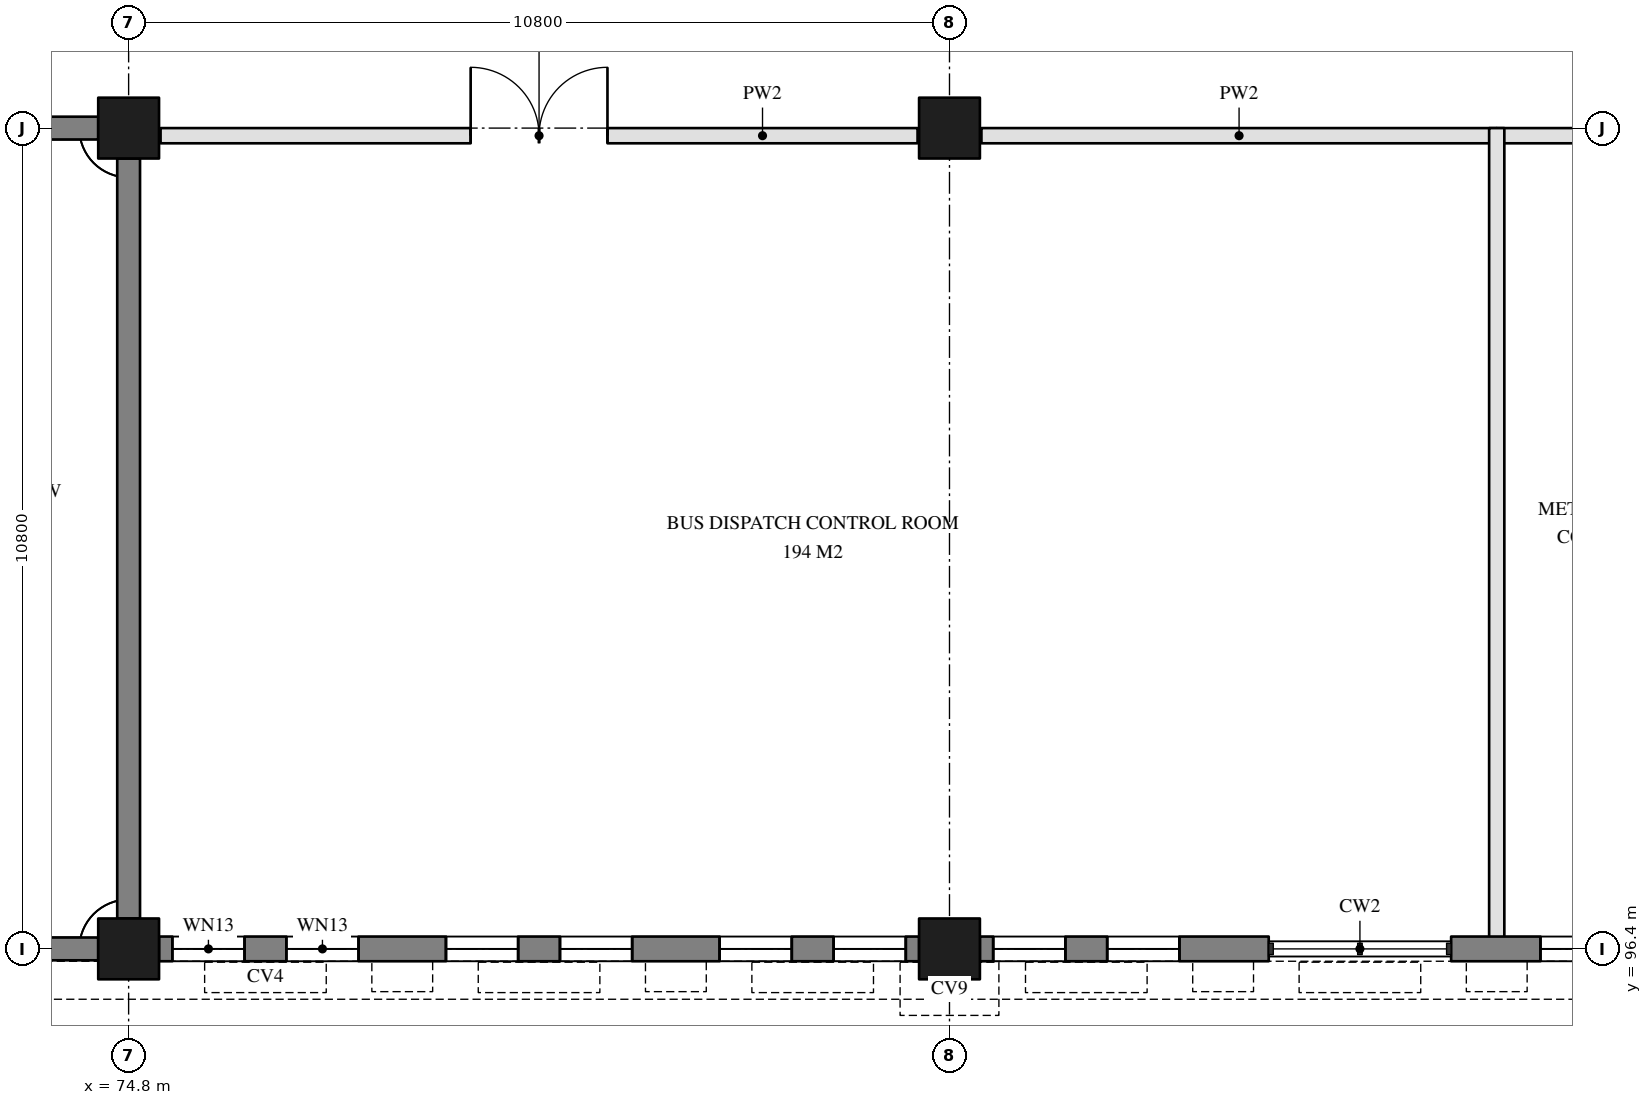
"""IFC4 building model, lengths in metres.
Left out: names, types, materials, properties, quantities, classifications, styles, units other than length and angle.
Written with IfcOpenShell. Run it as: python <this file> out.ifc"""

import sys

from ifc_helpers import new_model, si_unit, direction, frame, frame_2d, origin, origin_2d, place, context, subcontext, project, spatial, rectangle, extrude, element, fill, save


model = new_model("IFC4")
c1 = context("Model", 3, precision=1e-05, world=origin(), true_north=direction((0.0, 1.0)))
c2 = subcontext(c1, "Body", "Model", "MODEL_VIEW")
j1 = project(units=[si_unit("LENGTHUNIT", "METRE"), si_unit("PLANEANGLEUNIT", "RADIAN")], contexts=[c1])
p1 = place(None, origin())
s1 = spatial("IfcSite", under=j1, at=p1, CompositionType="ELEMENT")
p2 = place(p1, origin())
s2 = spatial("IfcBuilding", under=s1, at=p2, CompositionType="ELEMENT")
p3 = place(p2, frame((0.0, 0.0, 8.7)))
s3 = spatial("IfcBuildingStorey", under=s2, at=p3, CompositionType="ELEMENT", Elevation=8.7)
for number, where, z_axis, x_axis in (
    (1, (74.8, 96.4, 0.0), (0.0, 0.0, 1.0), (1.0, 0.0, 0.0)),
    (2, (74.8, 107.2, 0.0), (0.0, 0.0, 1.0), (1.0, 0.0, 0.0)),
    (3, (85.6, 96.4, 0.0), (0.0, 0.0, 1.0), (1.0, 0.0, 0.0)),
    (4, (85.6, 107.2, 0.0), (0.0, 0.0, 1.0), (1.0, 0.0, 0.0)),
):
    element("IfcColumn", number, at=place(p3, frame(where, z_axis=z_axis, x_axis=x_axis)), inside=s3, PredefinedType="COLUMN", context=c2, shape_type="SweptSolid", body=[
        extrude(rectangle(XDim=0.8, YDim=0.8, at=origin_2d()), origin(), (0.0, 0.0, 1.0), 3.9),
    ])
for number, where, z_axis, x_axis in (
    (5, (64.4, 96.4, 0.0), (0.0, 0.0, 1.0), (1.0, 0.0, 0.0)),
    (6, (74.8, 96.8, 0.0), (0.0, 0.0, 1.0), (0.0, 1.0, 0.0)),
):
    element("IfcWall", number, at=place(p3, frame(where, z_axis=z_axis, x_axis=x_axis)), inside=s3, PredefinedType="SOLIDWALL", context=c2, shape_type="SweptSolid", body=[
        extrude(rectangle(XDim=10.0, YDim=0.3, at=frame_2d((5.0, 0.0))), origin(), (0.0, 0.0, 1.0), 3.9),
    ])
p4 = place(p3, frame((74.4, 107.2, 0.0), z_axis=(0.0, 0.0, 1.0), x_axis=(-1.0, 0.0, 0.0)))
e7 = element("IfcWall", 7, at=p4, inside=s3, PredefinedType="SOLIDWALL", context=c2, shape_type="SweptSolid", body=[
    extrude(rectangle(XDim=10.0, YDim=0.3, at=frame_2d((5.0, 0.0))), origin(), (0.0, 0.0, 1.0), 3.9),
])
p5 = place(p4, frame((2.0, 0.0, 0.0)))
e8 = element("IfcOpeningElement", 8, at=p5, cuts=e7, PredefinedType="OPENING", context=c2, shape_type="SweptSolid", body=[
    extrude(rectangle(XDim=1.8, YDim=2.1, at=frame_2d((0.9, 1.05))), frame((0.0, 0.16, 0.0), z_axis=(0.0, -1.0, 0.0), x_axis=(1.0, 0.0, 0.0)), (0.0, 0.0, 1.0), 0.32),
])
p6 = place(p4, frame((4.4, 0.0, 0.0)))
e9 = element("IfcOpeningElement", 9, at=p6, cuts=e7, PredefinedType="OPENING", context=c2, shape_type="SweptSolid", body=[
    extrude(rectangle(XDim=1.0, YDim=2.1, at=frame_2d((0.5, 1.05))), frame((0.0, 0.16, 0.0), z_axis=(0.0, -1.0, 0.0), x_axis=(1.0, 0.0, 0.0)), (0.0, 0.0, 1.0), 0.32),
])
p7 = place(p4, frame((6.8, 0.0, 0.0)))
e10 = element("IfcOpeningElement", 10, at=p7, cuts=e7, PredefinedType="OPENING", context=c2, shape_type="SweptSolid", body=[
    extrude(rectangle(XDim=0.9, YDim=2.1, at=frame_2d((0.45, 1.05))), frame((0.0, 0.16, 0.0), z_axis=(0.0, -1.0, 0.0), x_axis=(1.0, 0.0, 0.0)), (0.0, 0.0, 1.0), 0.32),
])
p8 = place(p3, frame((75.2, 96.4, 0.0), z_axis=(0.0, 0.0, 1.0), x_axis=(1.0, 0.0, 0.0)))
e11 = element("IfcWall", 11, at=p8, inside=s3, PredefinedType="SOLIDWALL", context=c2, shape_type="SweptSolid", body=[
    extrude(rectangle(XDim=10.0, YDim=0.325, at=frame_2d((5.0, 0.0))), origin(), (0.0, 0.0, 1.0), 2.8),
])
p9 = place(p8, frame((0.175, 0.0, 0.5)))
e12 = element("IfcOpeningElement", 12, at=p9, cuts=e11, PredefinedType="OPENING", context=c2, shape_type="SweptSolid", body=[
    extrude(rectangle(XDim=0.95, YDim=2.25, at=frame_2d((0.475, 1.125))), frame((0.0, 0.172, 0.0), z_axis=(0.0, -1.0, 0.0), x_axis=(1.0, 0.0, 0.0)), (0.0, 0.0, 1.0), 0.345),
])
p10 = place(p8, frame((3.775, 0.0, 0.5)))
e13 = element("IfcOpeningElement", 13, at=p10, cuts=e11, PredefinedType="OPENING", context=c2, shape_type="SweptSolid", body=[
    extrude(rectangle(XDim=0.95, YDim=2.25, at=frame_2d((0.475, 1.125))), frame((0.0, 0.172, 0.0), z_axis=(0.0, -1.0, 0.0), x_axis=(1.0, 0.0, 0.0)), (0.0, 0.0, 1.0), 0.345),
])
p11 = place(p8, frame((7.375, 0.0, 0.5)))
e14 = element("IfcOpeningElement", 14, at=p11, cuts=e11, PredefinedType="OPENING", context=c2, shape_type="SweptSolid", body=[
    extrude(rectangle(XDim=0.95, YDim=2.25, at=frame_2d((0.475, 1.125))), frame((0.0, 0.172, 0.0), z_axis=(0.0, -1.0, 0.0), x_axis=(1.0, 0.0, 0.0)), (0.0, 0.0, 1.0), 0.345),
])
p12 = place(p8, frame((1.675, 0.0, 0.5)))
e15 = element("IfcOpeningElement", 15, at=p12, cuts=e11, PredefinedType="OPENING", context=c2, shape_type="SweptSolid", body=[
    extrude(rectangle(XDim=0.95, YDim=2.25, at=frame_2d((0.475, 1.125))), frame((0.0, 0.172, 0.0), z_axis=(0.0, -1.0, 0.0), x_axis=(1.0, 0.0, 0.0)), (0.0, 0.0, 1.0), 0.345),
])
p13 = place(p8, frame((5.275, 0.0, 0.5)))
e16 = element("IfcOpeningElement", 16, at=p13, cuts=e11, PredefinedType="OPENING", context=c2, shape_type="SweptSolid", body=[
    extrude(rectangle(XDim=0.95, YDim=2.25, at=frame_2d((0.475, 1.125))), frame((0.0, 0.172, 0.0), z_axis=(0.0, -1.0, 0.0), x_axis=(1.0, 0.0, 0.0)), (0.0, 0.0, 1.0), 0.345),
])
p14 = place(p8, frame((8.875, 0.0, 0.5)))
e17 = element("IfcOpeningElement", 17, at=p14, cuts=e11, PredefinedType="OPENING", context=c2, shape_type="SweptSolid", body=[
    extrude(rectangle(XDim=0.95, YDim=2.25, at=frame_2d((0.475, 1.125))), frame((0.0, 0.172, 0.0), z_axis=(0.0, -1.0, 0.0), x_axis=(1.0, 0.0, 0.0)), (0.0, 0.0, 1.0), 0.345),
])
p15 = place(p3, frame((86.0, 96.4, 0.0), z_axis=(0.0, 0.0, 1.0), x_axis=(1.0, 0.0, 0.0)))
e18 = element("IfcWall", 18, at=p15, inside=s3, PredefinedType="SOLIDWALL", context=c2, shape_type="SweptSolid", body=[
    extrude(rectangle(XDim=3.8, YDim=0.325, at=frame_2d((1.9, 0.0))), origin(), (0.0, 0.0, 1.0), 2.8),
])
p16 = place(p15, frame((0.175, 0.0, 0.5)))
e19 = element("IfcOpeningElement", 19, at=p16, cuts=e18, PredefinedType="OPENING", context=c2, shape_type="SweptSolid", body=[
    extrude(rectangle(XDim=0.95, YDim=2.25, at=frame_2d((0.475, 1.125))), frame((0.0, 0.172, 0.0), z_axis=(0.0, -1.0, 0.0), x_axis=(1.0, 0.0, 0.0)), (0.0, 0.0, 1.0), 0.345),
])
p17 = place(p15, frame((1.675, 0.0, 0.5)))
e20 = element("IfcOpeningElement", 20, at=p17, cuts=e18, PredefinedType="OPENING", context=c2, shape_type="SweptSolid", body=[
    extrude(rectangle(XDim=0.95, YDim=2.25, at=frame_2d((0.475, 1.125))), frame((0.0, 0.172, 0.0), z_axis=(0.0, -1.0, 0.0), x_axis=(1.0, 0.0, 0.0)), (0.0, 0.0, 1.0), 0.345),
])
p18 = place(p3, frame((92.2, 96.4, 0.0), z_axis=(0.0, 0.0, 1.0), x_axis=(1.0, 0.0, 0.0)))
e21 = element("IfcWall", 21, at=p18, inside=s3, PredefinedType="SOLIDWALL", context=c2, shape_type="SweptSolid", body=[
    extrude(rectangle(XDim=3.8, YDim=0.325, at=frame_2d((1.9, 0.0))), origin(), (0.0, 0.0, 1.0), 2.8),
])
p19 = place(p18, frame((1.175, 0.0, 0.5)))
e22 = element("IfcOpeningElement", 22, at=p19, cuts=e21, PredefinedType="OPENING", context=c2, shape_type="SweptSolid", body=[
    extrude(rectangle(XDim=0.95, YDim=2.25, at=frame_2d((0.475, 1.125))), frame((0.0, 0.172, 0.0), z_axis=(0.0, -1.0, 0.0), x_axis=(1.0, 0.0, 0.0)), (0.0, 0.0, 1.0), 0.345),
])
p20 = place(p18, frame((2.675, 0.0, 0.5)))
e23 = element("IfcOpeningElement", 23, at=p20, cuts=e21, PredefinedType="OPENING", context=c2, shape_type="SweptSolid", body=[
    extrude(rectangle(XDim=0.95, YDim=2.25, at=frame_2d((0.475, 1.125))), frame((0.0, 0.172, 0.0), z_axis=(0.0, -1.0, 0.0), x_axis=(1.0, 0.0, 0.0)), (0.0, 0.0, 1.0), 0.345),
])
p21 = place(p3, frame((86.02, 107.1, 0.0), z_axis=(0.0, 0.0, 1.0), x_axis=(1.0, 0.0, 0.0)))
e24 = element("IfcWall", 24, at=p21, inside=s3, PredefinedType="PARTITIONING", context=c2, shape_type="SweptSolid", body=[
    extrude(rectangle(XDim=6.78, YDim=0.2, at=frame_2d((3.39, 0.0))), origin(), (0.0, 0.0, 1.0), 2.8),
])
p22 = place(p3, frame((75.22, 107.1, 0.0), z_axis=(0.0, 0.0, 1.0), x_axis=(1.0, 0.0, 0.0)))
e25 = element("IfcWall", 25, at=p22, inside=s3, PredefinedType="PARTITIONING", context=c2, shape_type="SweptSolid", body=[
    extrude(rectangle(XDim=9.96, YDim=0.2, at=frame_2d((4.98, 0.0))), origin(), (0.0, 0.0, 1.0), 2.8),
])
p23 = place(p22, frame((4.08, 0.0, 0.0)))
e26 = element("IfcOpeningElement", 26, at=p23, cuts=e25, PredefinedType="OPENING", context=c2, shape_type="SweptSolid", body=[
    extrude(rectangle(XDim=1.8, YDim=2.1, at=frame_2d((0.9, 1.05))), frame((0.0, 0.11, 0.0), z_axis=(0.0, -1.0, 0.0), x_axis=(1.0, 0.0, 0.0)), (0.0, 0.0, 1.0), 0.22),
])
p24 = place(p3, frame((92.8, 107.1, 0.0), z_axis=(0.0, 0.0, 1.0), x_axis=(1.0, 0.0, 0.0)))
e27 = element("IfcWall", 27, at=p24, inside=s3, PredefinedType="PARTITIONING", context=c2, shape_type="SweptSolid", body=[
    extrude(rectangle(XDim=3.18, YDim=0.2, at=frame_2d((1.59, 0.0))), origin(), (0.0, 0.0, 1.0), 2.8),
])
p25 = place(p3, frame((92.8, 96.4, 0.0), z_axis=(0.0, 0.0, 1.0), x_axis=(0.0, 1.0, 0.0)))
e28 = element("IfcWall", 28, at=p25, inside=s3, PredefinedType="PARTITIONING", context=c2, shape_type="SweptSolid", body=[
    extrude(rectangle(XDim=10.8, YDim=0.2, at=frame_2d((5.4, 0.0))), origin(), (0.0, 0.0, 1.0), 2.8),
])
p26 = place(p9, origin())
e29 = element("IfcWindow", 29, at=p26, inside=s3, PartitioningType="SINGLE_PANEL", PredefinedType="WINDOW", context=c2, shape_type="SweptSolid", body=[
    extrude(rectangle(XDim=0.95, YDim=2.25, at=frame_2d((0.475, 1.125))), frame((0.0, 0.03, 0.0), z_axis=(0.0, -1.0, 0.0), x_axis=(1.0, 0.0, 0.0)), (0.0, 0.0, 1.0), 0.06),
])
fill(e12, e29)
p27 = place(p10, origin())
e30 = element("IfcWindow", 30, at=p27, inside=s3, PartitioningType="SINGLE_PANEL", PredefinedType="WINDOW", context=c2, shape_type="SweptSolid", body=[
    extrude(rectangle(XDim=0.95, YDim=2.25, at=frame_2d((0.475, 1.125))), frame((0.0, 0.03, 0.0), z_axis=(0.0, -1.0, 0.0), x_axis=(1.0, 0.0, 0.0)), (0.0, 0.0, 1.0), 0.06),
])
fill(e13, e30)
p28 = place(p11, origin())
e31 = element("IfcWindow", 31, at=p28, inside=s3, PartitioningType="SINGLE_PANEL", PredefinedType="WINDOW", context=c2, shape_type="SweptSolid", body=[
    extrude(rectangle(XDim=0.95, YDim=2.25, at=frame_2d((0.475, 1.125))), frame((0.0, 0.03, 0.0), z_axis=(0.0, -1.0, 0.0), x_axis=(1.0, 0.0, 0.0)), (0.0, 0.0, 1.0), 0.06),
])
fill(e14, e31)
p29 = place(p16, origin())
e32 = element("IfcWindow", 32, at=p29, inside=s3, PartitioningType="SINGLE_PANEL", PredefinedType="WINDOW", context=c2, shape_type="SweptSolid", body=[
    extrude(rectangle(XDim=0.95, YDim=2.25, at=frame_2d((0.475, 1.125))), frame((0.0, 0.03, 0.0), z_axis=(0.0, -1.0, 0.0), x_axis=(1.0, 0.0, 0.0)), (0.0, 0.0, 1.0), 0.06),
])
fill(e19, e32)
p30 = place(p12, origin())
e33 = element("IfcWindow", 33, at=p30, inside=s3, PartitioningType="SINGLE_PANEL", PredefinedType="WINDOW", context=c2, shape_type="SweptSolid", body=[
    extrude(rectangle(XDim=0.95, YDim=2.25, at=frame_2d((0.475, 1.125))), frame((0.0, 0.03, 0.0), z_axis=(0.0, -1.0, 0.0), x_axis=(1.0, 0.0, 0.0)), (0.0, 0.0, 1.0), 0.06),
])
fill(e15, e33)
p31 = place(p13, origin())
e34 = element("IfcWindow", 34, at=p31, inside=s3, PartitioningType="SINGLE_PANEL", PredefinedType="WINDOW", context=c2, shape_type="SweptSolid", body=[
    extrude(rectangle(XDim=0.95, YDim=2.25, at=frame_2d((0.475, 1.125))), frame((0.0, 0.03, 0.0), z_axis=(0.0, -1.0, 0.0), x_axis=(1.0, 0.0, 0.0)), (0.0, 0.0, 1.0), 0.06),
])
fill(e16, e34)
p32 = place(p14, origin())
e35 = element("IfcWindow", 35, at=p32, inside=s3, PartitioningType="SINGLE_PANEL", PredefinedType="WINDOW", context=c2, shape_type="SweptSolid", body=[
    extrude(rectangle(XDim=0.95, YDim=2.25, at=frame_2d((0.475, 1.125))), frame((0.0, 0.03, 0.0), z_axis=(0.0, -1.0, 0.0), x_axis=(1.0, 0.0, 0.0)), (0.0, 0.0, 1.0), 0.06),
])
fill(e17, e35)
p33 = place(p17, origin())
e36 = element("IfcWindow", 36, at=p33, inside=s3, PartitioningType="SINGLE_PANEL", PredefinedType="WINDOW", context=c2, shape_type="SweptSolid", body=[
    extrude(rectangle(XDim=0.95, YDim=2.25, at=frame_2d((0.475, 1.125))), frame((0.0, 0.03, 0.0), z_axis=(0.0, -1.0, 0.0), x_axis=(1.0, 0.0, 0.0)), (0.0, 0.0, 1.0), 0.06),
])
fill(e20, e36)
p34 = place(p19, origin())
e37 = element("IfcWindow", 37, at=p34, inside=s3, PartitioningType="SINGLE_PANEL", PredefinedType="WINDOW", context=c2, shape_type="SweptSolid", body=[
    extrude(rectangle(XDim=0.95, YDim=2.25, at=frame_2d((0.475, 1.125))), frame((0.0, 0.03, 0.0), z_axis=(0.0, -1.0, 0.0), x_axis=(1.0, 0.0, 0.0)), (0.0, 0.0, 1.0), 0.06),
])
fill(e22, e37)
p35 = place(p23, frame((1.8, 0.0, 0.0), z_axis=(0.0, 0.0, 1.0), x_axis=(-1.0, 0.0, 0.0)))
e38 = element("IfcDoor", 38, at=p35, inside=s3, OperationType="DOUBLE_DOOR_DOUBLE_SWING", PredefinedType="DOOR", context=c2, shape_type="SweptSolid", body=[
    extrude(rectangle(XDim=1.8, YDim=2.1, at=frame_2d((0.9, 1.05))), frame((0.0, 0.025, 0.0), z_axis=(0.0, -1.0, 0.0), x_axis=(1.0, 0.0, 0.0)), (0.0, 0.0, 1.0), 0.05),
])
fill(e26, e38)
save(model, sys.argv[1])
